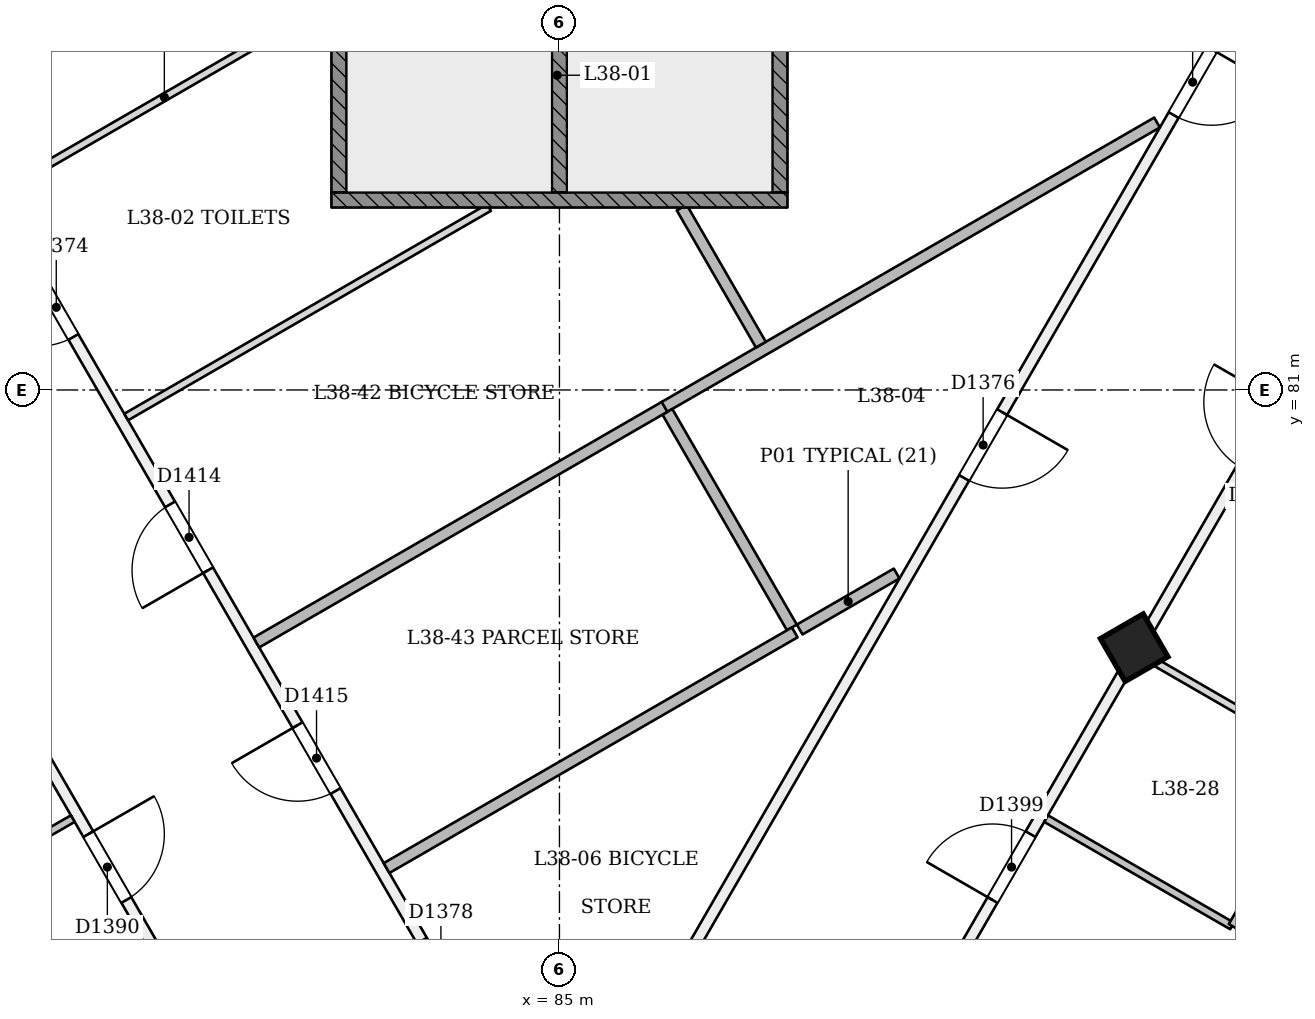
"""IFC4 building model, lengths in metres.
Left out: names, types, materials, properties, quantities, classifications, styles, units other than length and angle.
Written with IfcOpenShell. Run it as: python <this file> out.ifc"""

import sys

from ifc_helpers import new_model, si_unit, direction, frame, frame_2d, origin, origin_2d, place, context, subcontext, project, spatial, rectangle, extrude, element, fill, save


model = new_model("IFC4")
c1 = context("Model", 3, precision=1e-05, world=origin(), true_north=direction((0.0, 1.0)))
c2 = subcontext(c1, "Body", "Model", "MODEL_VIEW")
j1 = project(units=[si_unit("LENGTHUNIT", "METRE"), si_unit("PLANEANGLEUNIT", "RADIAN")], contexts=[c1])
p1 = place(None, origin())
s1 = spatial("IfcSite", under=j1, at=p1, CompositionType="ELEMENT")
p2 = place(p1, origin())
s2 = spatial("IfcBuilding", under=s1, at=p2, CompositionType="ELEMENT")
p3 = place(p2, frame((0.0, 0.0, 149.4)))
s3 = spatial("IfcBuildingStorey", under=s2, at=p3, CompositionType="ELEMENT", Elevation=149.4)
p4 = place(p3, frame((92.588, 77.563, -0.02), z_axis=(-0.022222910879, 0.038415824599, 0.999014697916), x_axis=(-0.499512974266, -0.866022161456, 0.022190187181)))
e1 = element("IfcColumn", 1, at=p4, inside=s3, PredefinedType="COLUMN", context=c2, shape_type="SweptSolid", body=[
    extrude(rectangle(XDim=0.65, YDim=0.65, at=origin_2d()), origin(), (0.0, 0.0, 1.0), 3.604),
])
p5 = place(p3, frame((96.304, 90.2, 0.0), z_axis=(0.0, 0.0, 1.0), x_axis=(-0.500004509943, -0.866022799952, 0.0)))
e2 = element("IfcWall", 2, at=p5, inside=s3, PredefinedType="PARTITIONING", context=c2, shape_type="SweptSolid", body=[
    extrude(rectangle(XDim=22.478, YDim=0.15, at=frame_2d((11.239, 0.0))), origin(), (0.0, 0.0, 1.0), 3.15),
])
p6 = place(p5, frame((10.96, 0.0, 0.0)))
e3 = element("IfcOpeningElement", 3, at=p6, cuts=e2, PredefinedType="OPENING", context=c2, shape_type="SweptSolid", body=[
    extrude(rectangle(XDim=1.0, YDim=2.1, at=frame_2d((0.5, 1.05))), frame((0.0, 0.085, 0.0), z_axis=(0.0, -1.0, 0.0), x_axis=(1.0, 0.0, 0.0)), (0.0, 0.0, 1.0), 0.171),
])
p7 = place(p5, frame((5.447, 0.0, 0.0)))
e4 = element("IfcOpeningElement", 4, at=p7, cuts=e2, PredefinedType="OPENING", context=c2, shape_type="SweptSolid", body=[
    extrude(rectangle(XDim=1.0, YDim=2.1, at=frame_2d((0.5, 1.05))), frame((0.0, 0.085, 0.0), z_axis=(0.0, -1.0, 0.0), x_axis=(1.0, 0.0, 0.0)), (0.0, 0.0, 1.0), 0.171),
])
p8 = place(p3, frame((85.0, 70.621, 0.0), z_axis=(0.0, 0.0, 1.0), x_axis=(-0.500003200507, 0.866023555963, 0.0)))
e5 = element("IfcWall", 5, at=p8, inside=s3, PredefinedType="PARTITIONING", context=c2, shape_type="SweptSolid", body=[
    extrude(rectangle(XDim=22.608, YDim=0.15, at=frame_2d((11.304, 0.0))), origin(), (0.0, 0.0, 1.0), 3.15),
])
p9 = place(p8, frame((12.79, 0.0, 0.0)))
e6 = element("IfcOpeningElement", 6, at=p9, cuts=e5, PredefinedType="OPENING", context=c2, shape_type="SweptSolid", body=[
    extrude(rectangle(XDim=0.9, YDim=2.1, at=frame_2d((0.45, 1.05))), frame((0.0, 0.085, 0.0), z_axis=(0.0, -1.0, 0.0), x_axis=(1.0, 0.0, 0.0)), (0.0, 0.0, 1.0), 0.171),
])
p10 = place(p8, frame((19.298, 0.0, 0.0)))
e7 = element("IfcOpeningElement", 7, at=p10, cuts=e5, PredefinedType="OPENING", context=c2, shape_type="SweptSolid", body=[
    extrude(rectangle(XDim=0.9, YDim=2.1, at=frame_2d((0.45, 1.05))), frame((0.0, 0.085, 0.0), z_axis=(0.0, -1.0, 0.0), x_axis=(1.0, 0.0, 0.0)), (0.0, 0.0, 1.0), 0.171),
])
p11 = place(p8, frame((2.619, 0.0, 0.0)))
e8 = element("IfcOpeningElement", 8, at=p11, cuts=e5, PredefinedType="OPENING", context=c2, shape_type="SweptSolid", body=[
    extrude(rectangle(XDim=1.0, YDim=2.1, at=frame_2d((0.5, 1.05))), frame((0.0, 0.085, 0.0), z_axis=(0.0, -1.0, 0.0), x_axis=(1.0, 0.0, 0.0)), (0.0, 0.0, 1.0), 0.171),
])
p12 = place(p8, frame((16.21, 0.0, 0.0)))
e9 = element("IfcOpeningElement", 9, at=p12, cuts=e5, PredefinedType="OPENING", context=c2, shape_type="SweptSolid", body=[
    extrude(rectangle(XDim=1.0, YDim=2.1, at=frame_2d((0.5, 1.05))), frame((0.0, 0.085, 0.0), z_axis=(0.0, -1.0, 0.0), x_axis=(1.0, 0.0, 0.0)), (0.0, 0.0, 1.0), 0.171),
])
p13 = place(p8, frame((9.246, 0.0, 0.0)))
e10 = element("IfcOpeningElement", 10, at=p13, cuts=e5, PredefinedType="OPENING", context=c2, shape_type="SweptSolid", body=[
    extrude(rectangle(XDim=1.0, YDim=2.1, at=frame_2d((0.5, 1.05))), frame((0.0, 0.085, 0.0), z_axis=(0.0, -1.0, 0.0), x_axis=(1.0, 0.0, 0.0)), (0.0, 0.0, 1.0), 0.171),
])
p14 = place(p8, frame((5.892, 0.0, 0.0)))
e11 = element("IfcOpeningElement", 11, at=p14, cuts=e5, PredefinedType="OPENING", context=c2, shape_type="SweptSolid", body=[
    extrude(rectangle(XDim=1.0, YDim=2.1, at=frame_2d((0.5, 1.05))), frame((0.0, 0.085, 0.0), z_axis=(0.0, -1.0, 0.0), x_axis=(1.0, 0.0, 0.0)), (0.0, 0.0, 1.0), 0.171),
])
p15 = place(p3, frame((65.324, 98.5, 0.0), z_axis=(0.0, 0.0, 1.0), x_axis=(0.500001898363, -0.866024307761, 0.0)))
e12 = element("IfcWall", 12, at=p15, inside=s3, PredefinedType="PARTITIONING", context=c2, shape_type="SweptSolid", body=[
    extrude(rectangle(XDim=39.351, YDim=0.15, at=frame_2d((19.675, 0.0))), origin(), (0.0, 0.0, 1.0), 2.75),
])
p16 = place(p15, frame((0.2, 0.0, 0.0)))
e13 = element("IfcOpeningElement", 13, at=p16, cuts=e12, PredefinedType="OPENING", context=c2, shape_type="SweptSolid", body=[
    extrude(rectangle(XDim=1.2, YDim=2.1, at=frame_2d((0.6, 1.05))), frame((0.0, 0.085, 0.0), z_axis=(0.0, -1.0, 0.0), x_axis=(1.0, 0.0, 0.0)), (0.0, 0.0, 1.0), 0.171),
])
p17 = place(p15, frame((3.425, 0.0, 0.0)))
e14 = element("IfcOpeningElement", 14, at=p17, cuts=e12, PredefinedType="OPENING", context=c2, shape_type="SweptSolid", body=[
    extrude(rectangle(XDim=1.0, YDim=2.1, at=frame_2d((0.5, 1.05))), frame((0.0, 0.085, 0.0), z_axis=(0.0, -1.0, 0.0), x_axis=(1.0, 0.0, 0.0)), (0.0, 0.0, 1.0), 0.171),
])
p18 = place(p15, frame((9.004, 0.0, 0.0)))
e15 = element("IfcOpeningElement", 15, at=p18, cuts=e12, PredefinedType="OPENING", context=c2, shape_type="SweptSolid", body=[
    extrude(rectangle(XDim=1.1, YDim=2.1, at=frame_2d((0.55, 1.05))), frame((0.0, 0.085, 0.0), z_axis=(0.0, -1.0, 0.0), x_axis=(1.0, 0.0, 0.0)), (0.0, 0.0, 1.0), 0.171),
])
p19 = place(p15, frame((11.396, 0.0, 0.0)))
e16 = element("IfcOpeningElement", 16, at=p19, cuts=e12, PredefinedType="OPENING", context=c2, shape_type="SweptSolid", body=[
    extrude(rectangle(XDim=1.0, YDim=2.1, at=frame_2d((0.5, 1.05))), frame((0.0, 0.085, 0.0), z_axis=(0.0, -1.0, 0.0), x_axis=(1.0, 0.0, 0.0)), (0.0, 0.0, 1.0), 0.171),
])
p20 = place(p15, frame((17.955, 0.0, 0.0)))
e17 = element("IfcOpeningElement", 17, at=p20, cuts=e12, PredefinedType="OPENING", context=c2, shape_type="SweptSolid", body=[
    extrude(rectangle(XDim=1.0, YDim=2.1, at=frame_2d((0.5, 1.05))), frame((0.0, 0.085, 0.0), z_axis=(0.0, -1.0, 0.0), x_axis=(1.0, 0.0, 0.0)), (0.0, 0.0, 1.0), 0.171),
])
p21 = place(p15, frame((20.396, 0.0, 0.0)))
e18 = element("IfcOpeningElement", 18, at=p21, cuts=e12, PredefinedType="OPENING", context=c2, shape_type="SweptSolid", body=[
    extrude(rectangle(XDim=1.0, YDim=2.1, at=frame_2d((0.5, 1.05))), frame((0.0, 0.085, 0.0), z_axis=(0.0, -1.0, 0.0), x_axis=(1.0, 0.0, 0.0)), (0.0, 0.0, 1.0), 0.171),
])
p22 = place(p15, frame((26.955, 0.0, 0.0)))
e19 = element("IfcOpeningElement", 19, at=p22, cuts=e12, PredefinedType="OPENING", context=c2, shape_type="SweptSolid", body=[
    extrude(rectangle(XDim=1.0, YDim=2.1, at=frame_2d((0.5, 1.05))), frame((0.0, 0.085, 0.0), z_axis=(0.0, -1.0, 0.0), x_axis=(1.0, 0.0, 0.0)), (0.0, 0.0, 1.0), 0.171),
])
p23 = place(p15, frame((29.396, 0.0, 0.0)))
e20 = element("IfcOpeningElement", 20, at=p23, cuts=e12, PredefinedType="OPENING", context=c2, shape_type="SweptSolid", body=[
    extrude(rectangle(XDim=1.0, YDim=2.1, at=frame_2d((0.5, 1.05))), frame((0.0, 0.085, 0.0), z_axis=(0.0, -1.0, 0.0), x_axis=(1.0, 0.0, 0.0)), (0.0, 0.0, 1.0), 0.171),
])
p24 = place(p15, frame((36.004, 0.0, 0.0)))
e21 = element("IfcOpeningElement", 21, at=p24, cuts=e12, PredefinedType="OPENING", context=c2, shape_type="SweptSolid", body=[
    extrude(rectangle(XDim=1.1, YDim=2.1, at=frame_2d((0.55, 1.05))), frame((0.0, 0.085, 0.0), z_axis=(0.0, -1.0, 0.0), x_axis=(1.0, 0.0, 0.0)), (0.0, 0.0, 1.0), 0.171),
])
p25 = place(p3, frame((85.065, 64.534, 0.0), z_axis=(0.0, 0.0, 1.0), x_axis=(0.500002644497, 0.866023876978, 0.0)))
e22 = element("IfcWall", 22, at=p25, inside=s3, PredefinedType="PARTITIONING", context=c2, shape_type="SweptSolid", body=[
    extrude(rectangle(XDim=39.221, YDim=0.15, at=frame_2d((19.61, 0.0))), origin(), (0.0, 0.0, 1.0), 2.75),
])
p26 = place(p25, frame((0.506, 0.0, 0.0)))
e23 = element("IfcOpeningElement", 23, at=p26, cuts=e22, PredefinedType="OPENING", context=c2, shape_type="SweptSolid", body=[
    extrude(rectangle(XDim=1.2, YDim=2.1, at=frame_2d((0.6, 1.05))), frame((0.0, 0.085, 0.0), z_axis=(0.0, -1.0, 0.0), x_axis=(1.0, 0.0, 0.0)), (0.0, 0.0, 1.0), 0.171),
])
p27 = place(p25, frame((8.825, 0.0, 0.0)))
e24 = element("IfcOpeningElement", 24, at=p27, cuts=e22, PredefinedType="OPENING", context=c2, shape_type="SweptSolid", body=[
    extrude(rectangle(XDim=1.0, YDim=2.1, at=frame_2d((0.5, 1.05))), frame((0.0, 0.085, 0.0), z_axis=(0.0, -1.0, 0.0), x_axis=(1.0, 0.0, 0.0)), (0.0, 0.0, 1.0), 0.171),
])
p28 = place(p25, frame((11.266, 0.0, 0.0)))
e25 = element("IfcOpeningElement", 25, at=p28, cuts=e22, PredefinedType="OPENING", context=c2, shape_type="SweptSolid", body=[
    extrude(rectangle(XDim=1.0, YDim=2.1, at=frame_2d((0.5, 1.05))), frame((0.0, 0.085, 0.0), z_axis=(0.0, -1.0, 0.0), x_axis=(1.0, 0.0, 0.0)), (0.0, 0.0, 1.0), 0.171),
])
p29 = place(p25, frame((17.825, 0.0, 0.0)))
e26 = element("IfcOpeningElement", 26, at=p29, cuts=e22, PredefinedType="OPENING", context=c2, shape_type="SweptSolid", body=[
    extrude(rectangle(XDim=1.0, YDim=2.1, at=frame_2d((0.5, 1.05))), frame((0.0, 0.085, 0.0), z_axis=(0.0, -1.0, 0.0), x_axis=(1.0, 0.0, 0.0)), (0.0, 0.0, 1.0), 0.171),
])
p30 = place(p25, frame((20.266, 0.0, 0.0)))
e27 = element("IfcOpeningElement", 27, at=p30, cuts=e22, PredefinedType="OPENING", context=c2, shape_type="SweptSolid", body=[
    extrude(rectangle(XDim=1.0, YDim=2.1, at=frame_2d((0.5, 1.05))), frame((0.0, 0.085, 0.0), z_axis=(0.0, -1.0, 0.0), x_axis=(1.0, 0.0, 0.0)), (0.0, 0.0, 1.0), 0.171),
])
p31 = place(p25, frame((26.825, 0.0, 0.0)))
e28 = element("IfcOpeningElement", 28, at=p31, cuts=e22, PredefinedType="OPENING", context=c2, shape_type="SweptSolid", body=[
    extrude(rectangle(XDim=1.0, YDim=2.1, at=frame_2d((0.5, 1.05))), frame((0.0, 0.085, 0.0), z_axis=(0.0, -1.0, 0.0), x_axis=(1.0, 0.0, 0.0)), (0.0, 0.0, 1.0), 0.171),
])
p32 = place(p25, frame((30.296, 0.0, 0.0)))
e29 = element("IfcOpeningElement", 29, at=p32, cuts=e22, PredefinedType="OPENING", context=c2, shape_type="SweptSolid", body=[
    extrude(rectangle(XDim=1.0, YDim=2.1, at=frame_2d((0.5, 1.05))), frame((0.0, 0.085, 0.0), z_axis=(0.0, -1.0, 0.0), x_axis=(1.0, 0.0, 0.0)), (0.0, 0.0, 1.0), 0.171),
])
p33 = place(p25, frame((35.875, 0.0, 0.0)))
e30 = element("IfcOpeningElement", 30, at=p33, cuts=e22, PredefinedType="OPENING", context=c2, shape_type="SweptSolid", body=[
    extrude(rectangle(XDim=1.1, YDim=2.1, at=frame_2d((0.55, 1.05))), frame((0.0, 0.085, 0.0), z_axis=(0.0, -1.0, 0.0), x_axis=(1.0, 0.0, 0.0)), (0.0, 0.0, 1.0), 0.171),
])
p34 = place(p25, frame((37.821, 0.0, 0.0)))
e31 = element("IfcOpeningElement", 31, at=p34, cuts=e22, PredefinedType="OPENING", context=c2, shape_type="SweptSolid", body=[
    extrude(rectangle(XDim=1.2, YDim=2.1, at=frame_2d((0.6, 1.05))), frame((0.0, 0.085, 0.0), z_axis=(0.0, -1.0, 0.0), x_axis=(1.0, 0.0, 0.0)), (0.0, 0.0, 1.0), 0.171),
])
p35 = place(p3, frame((82.0, 86.121, 0.0), z_axis=(0.0, 0.0, 1.0), x_axis=(-0.866023813814, -0.5000027539, 0.0)))
e32 = element("IfcWall", 32, at=p35, inside=s3, PredefinedType="PARTITIONING", context=c2, shape_type="SweptSolid", body=[
    extrude(rectangle(XDim=5.077, YDim=0.1, at=frame_2d((2.538, 0.0))), origin(), (0.0, 0.0, 1.0), 3.15),
])
p36 = place(p3, frame((79.3, 80.644, 0.0), z_axis=(0.0, 0.0, 1.0), x_axis=(0.866032163869, 0.499988291006, 0.0)))
e33 = element("IfcWall", 33, at=p36, inside=s3, PredefinedType="PARTITIONING", context=c2, shape_type="SweptSolid", body=[
    extrude(rectangle(XDim=5.512, YDim=0.1, at=frame_2d((2.756, 0.0))), origin(), (0.0, 0.0, 1.0), 3.15),
])
p37 = place(p3, frame((88.16, 77.848, 0.0), z_axis=(0.0, 0.0, 1.0), x_axis=(0.86604208752, 0.499971101808, 0.0)))
e34 = element("IfcWall", 34, at=p37, inside=s3, PredefinedType="PARTITIONING", context=c2, shape_type="SweptSolid", body=[
    extrude(rectangle(XDim=1.473, YDim=0.15, at=frame_2d((0.737, 0.0))), origin(), (0.0, 0.0, 1.0), 3.15),
])
p38 = place(p3, frame((92.862, 84.519, 0.0), z_axis=(0.0, 0.0, 1.0), x_axis=(-0.866023543838, -0.500003221507, 0.0)))
e35 = element("IfcWall", 35, at=p38, inside=s3, PredefinedType="PARTITIONING", context=c2, shape_type="SweptSolid", body=[
    extrude(rectangle(XDim=7.502, YDim=0.15, at=frame_2d((3.751, 0.0))), origin(), (0.0, 0.0, 1.0), 3.15),
])
p39 = place(p3, frame((86.42, 80.713, 0.0), z_axis=(0.0, 0.0, 1.0), x_axis=(0.500010613097, -0.866019276224, 0.0)))
e36 = element("IfcWall", 36, at=p39, inside=s3, PredefinedType="PARTITIONING", context=c2, shape_type="SweptSolid", body=[
    extrude(rectangle(XDim=3.276, YDim=0.15, at=frame_2d((1.638, 0.0))), origin(), (0.0, 0.0, 1.0), 3.15),
])
p40 = place(p3, frame((88.095, 77.811, 0.0), z_axis=(0.0, 0.0, 1.0), x_axis=(-0.866022320763, -0.500005339912, 0.0)))
e37 = element("IfcWall", 37, at=p40, inside=s3, PredefinedType="PARTITIONING", context=c2, shape_type="SweptSolid", body=[
    extrude(rectangle(XDim=6.201, YDim=0.15, at=frame_2d((3.1, 0.0))), origin(), (0.0, 0.0, 1.0), 3.15),
])
for number, where, z_axis, x_axis in (
    (38, (78.597, 75.361, 0.0), (0.0, 0.0, 1.0), (-0.866, -0.5, 0.0)),
    (39, (93.849, 73.948, 0.0), (0.0, 0.0, 1.0), (-0.866, 0.5, 0.0)),
):
    element("IfcWall", number, at=place(p3, frame(where, z_axis=z_axis, x_axis=x_axis)), inside=s3, PredefinedType="PARTITIONING", context=c2, shape_type="SweptSolid", body=[
        extrude(rectangle(XDim=2.825, YDim=0.1, at=frame_2d((1.413, 0.0))), origin(), (0.0, 0.0, 1.0), 3.15),
    ])
p41 = place(p3, frame((95.056, 76.138, 0.0), z_axis=(0.0, 0.0, 1.0), x_axis=(-0.866042014628, 0.499971228071, 0.0)))
e40 = element("IfcWall", 40, at=p41, inside=s3, PredefinedType="PARTITIONING", context=c2, shape_type="SweptSolid", body=[
    extrude(rectangle(XDim=2.775, YDim=0.1, at=frame_2d((1.388, 0.0))), origin(), (0.0, 0.0, 1.0), 2.75),
])
p42 = place(p3, frame((93.903, 79.691, 0.0), z_axis=(0.0, 0.0, 1.0), x_axis=(0.866048868473, -0.499959355765, 0.0)))
e41 = element("IfcWall", 41, at=p42, inside=s3, PredefinedType="PARTITIONING", context=c2, shape_type="SweptSolid", body=[
    extrude(rectangle(XDim=2.825, YDim=0.1, at=frame_2d((1.413, 0.0))), origin(), (0.0, 0.0, 1.0), 3.15),
])
p43 = place(p3, frame((96.349, 78.279, 0.0), z_axis=(0.0, 0.0, 1.0), x_axis=(-0.500004234368, -0.866022959057, 0.0)))
e42 = element("IfcWall", 42, at=p43, inside=s3, PredefinedType="PARTITIONING", context=c2, shape_type="SweptSolid", body=[
    extrude(rectangle(XDim=5.0, YDim=0.1, at=frame_2d((2.5, 0.0))), origin(), (0.0, 0.0, 1.0), 2.75),
])
p44 = place(p43, frame((3.3, 0.0, 0.0)))
e43 = element("IfcOpeningElement", 43, at=p44, cuts=e42, PredefinedType="OPENING", context=c2, shape_type="SweptSolid", body=[
    extrude(rectangle(XDim=0.9, YDim=2.1, at=frame_2d((0.45, 1.05))), frame((0.0, 0.061, 0.0), z_axis=(0.0, -1.0, 0.0), x_axis=(1.0, 0.0, 0.0)), (0.0, 0.0, 1.0), 0.121),
])
p45 = place(p43, frame((0.8, 0.0, 0.0)))
e44 = element("IfcOpeningElement", 44, at=p45, cuts=e42, PredefinedType="OPENING", context=c2, shape_type="SweptSolid", body=[
    extrude(rectangle(XDim=0.9, YDim=2.1, at=frame_2d((0.45, 1.05))), frame((0.0, 0.061, 0.0), z_axis=(0.0, -1.0, 0.0), x_axis=(1.0, 0.0, 0.0)), (0.0, 0.0, 1.0), 0.121),
])
p46 = place(p3, frame((86.609, 83.4, 0.0), z_axis=(0.0, 0.0, 1.0), x_axis=(0.499996383721, -0.866027491634, 0.0)))
e45 = element("IfcWall", 45, at=p46, inside=s3, PredefinedType="PARTITIONING", context=c2, shape_type="SweptSolid", body=[
    extrude(rectangle(XDim=2.083, YDim=0.15, at=frame_2d((1.042, 0.0))), origin(), (0.0, 0.0, 1.0), 3.15),
])
p47 = place(p3, frame((81.013, 77.677, 0.0), z_axis=(0.0, 0.0, 1.0), x_axis=(0.866022320763, 0.500005339912, 0.0)))
e46 = element("IfcWall", 46, at=p47, inside=s3, PredefinedType="PARTITIONING", context=c2, shape_type="SweptSolid", body=[
    extrude(rectangle(XDim=6.201, YDim=0.15, at=frame_2d((3.1, 0.0))), origin(), (0.0, 0.0, 1.0), 3.15),
])
p48 = place(p3, frame((82.0, 83.5, 0.0), z_axis=(0.0, 0.0, 1.0), x_axis=(1.0, 0.0, 0.0)))
e47 = element("IfcWall", 47, at=p48, inside=s3, PredefinedType="SOLIDWALL", context=c2, shape_type="SweptSolid", body=[
    extrude(rectangle(XDim=6.0, YDim=0.2, at=frame_2d((3.0, 0.0))), origin(), (0.0, 0.0, 1.0), 3.15),
])
for number, where, z_axis, x_axis in (
    (48, (82.1, 83.6, 0.0), (0.0, 0.0, 1.0), (0.0, 1.0, 0.0)),
    (49, (87.9, 83.6, 0.0), (0.0, 0.0, 1.0), (0.0, 1.0, 0.0)),
    (50, (85.0, 83.6, 0.0), (0.0, 0.0, 1.0), (0.0, 1.0, 0.0)),
):
    element("IfcWall", number, at=place(p3, frame(where, z_axis=z_axis, x_axis=x_axis)), inside=s3, PredefinedType="SOLIDWALL", context=c2, shape_type="SweptSolid", body=[
        extrude(rectangle(XDim=6.8, YDim=0.2, at=frame_2d((3.4, 0.0))), origin(), (0.0, 0.0, 1.0), 3.15),
    ])
p49 = place(p9, origin())
e51 = element("IfcDoor", 51, at=p49, inside=s3, OperationType="SINGLE_SWING_RIGHT", PredefinedType="NOTDEFINED", context=c2, shape_type="SweptSolid", body=[
    extrude(rectangle(XDim=0.9, YDim=2.1, at=frame_2d((0.45, 1.05))), frame((0.0, 0.025, 0.0), z_axis=(0.0, -1.0, 0.0), x_axis=(1.0, 0.0, 0.0)), (0.0, 0.0, 1.0), 0.05),
])
fill(e6, e51)
p50 = place(p6, origin())
e52 = element("IfcDoor", 52, at=p50, inside=s3, OperationType="SINGLE_SWING_LEFT", PredefinedType="NOTDEFINED", context=c2, shape_type="SweptSolid", body=[
    extrude(rectangle(XDim=1.0, YDim=2.1, at=frame_2d((0.5, 1.05))), frame((0.0, 0.025, 0.0), z_axis=(0.0, -1.0, 0.0), x_axis=(1.0, 0.0, 0.0)), (0.0, 0.0, 1.0), 0.05),
])
fill(e3, e52)
p51 = place(p22, origin())
e53 = element("IfcDoor", 53, at=p51, inside=s3, OperationType="SINGLE_SWING_LEFT", PredefinedType="NOTDEFINED", context=c2, shape_type="SweptSolid", body=[
    extrude(rectangle(XDim=1.0, YDim=2.1, at=frame_2d((0.5, 1.05))), frame((0.0, 0.025, 0.0), z_axis=(0.0, -1.0, 0.0), x_axis=(1.0, 0.0, 0.0)), (0.0, 0.0, 1.0), 0.05),
])
fill(e19, e53)
p52 = place(p28, origin())
e54 = element("IfcDoor", 54, at=p52, inside=s3, OperationType="SINGLE_SWING_LEFT", PredefinedType="NOTDEFINED", context=c2, shape_type="SweptSolid", body=[
    extrude(rectangle(XDim=1.0, YDim=2.1, at=frame_2d((0.5, 1.05))), frame((0.0, 0.025, 0.0), z_axis=(0.0, -1.0, 0.0), x_axis=(1.0, 0.0, 0.0)), (0.0, 0.0, 1.0), 0.05),
])
fill(e25, e54)
p53 = place(p7, origin())
e55 = element("IfcDoor", 55, at=p53, inside=s3, OperationType="SINGLE_SWING_LEFT", PredefinedType="NOTDEFINED", context=c2, shape_type="SweptSolid", body=[
    extrude(rectangle(XDim=1.0, YDim=2.1, at=frame_2d((0.5, 1.05))), frame((0.0, 0.025, 0.0), z_axis=(0.0, -1.0, 0.0), x_axis=(1.0, 0.0, 0.0)), (0.0, 0.0, 1.0), 0.05),
])
fill(e4, e55)
p54 = place(p13, origin())
e56 = element("IfcDoor", 56, at=p54, inside=s3, OperationType="SINGLE_SWING_LEFT", PredefinedType="NOTDEFINED", context=c2, shape_type="SweptSolid", body=[
    extrude(rectangle(XDim=1.0, YDim=2.1, at=frame_2d((0.5, 1.05))), frame((0.0, 0.025, 0.0), z_axis=(0.0, -1.0, 0.0), x_axis=(1.0, 0.0, 0.0)), (0.0, 0.0, 1.0), 0.05),
])
fill(e10, e56)
p55 = place(p14, origin())
e57 = element("IfcDoor", 57, at=p55, inside=s3, OperationType="SINGLE_SWING_RIGHT", PredefinedType="NOTDEFINED", context=c2, shape_type="SweptSolid", body=[
    extrude(rectangle(XDim=1.0, YDim=2.1, at=frame_2d((0.5, 1.05))), frame((0.0, 0.025, 0.0), z_axis=(0.0, -1.0, 0.0), x_axis=(1.0, 0.0, 0.0)), (0.0, 0.0, 1.0), 0.05),
])
fill(e11, e57)
save(model, sys.argv[1])
